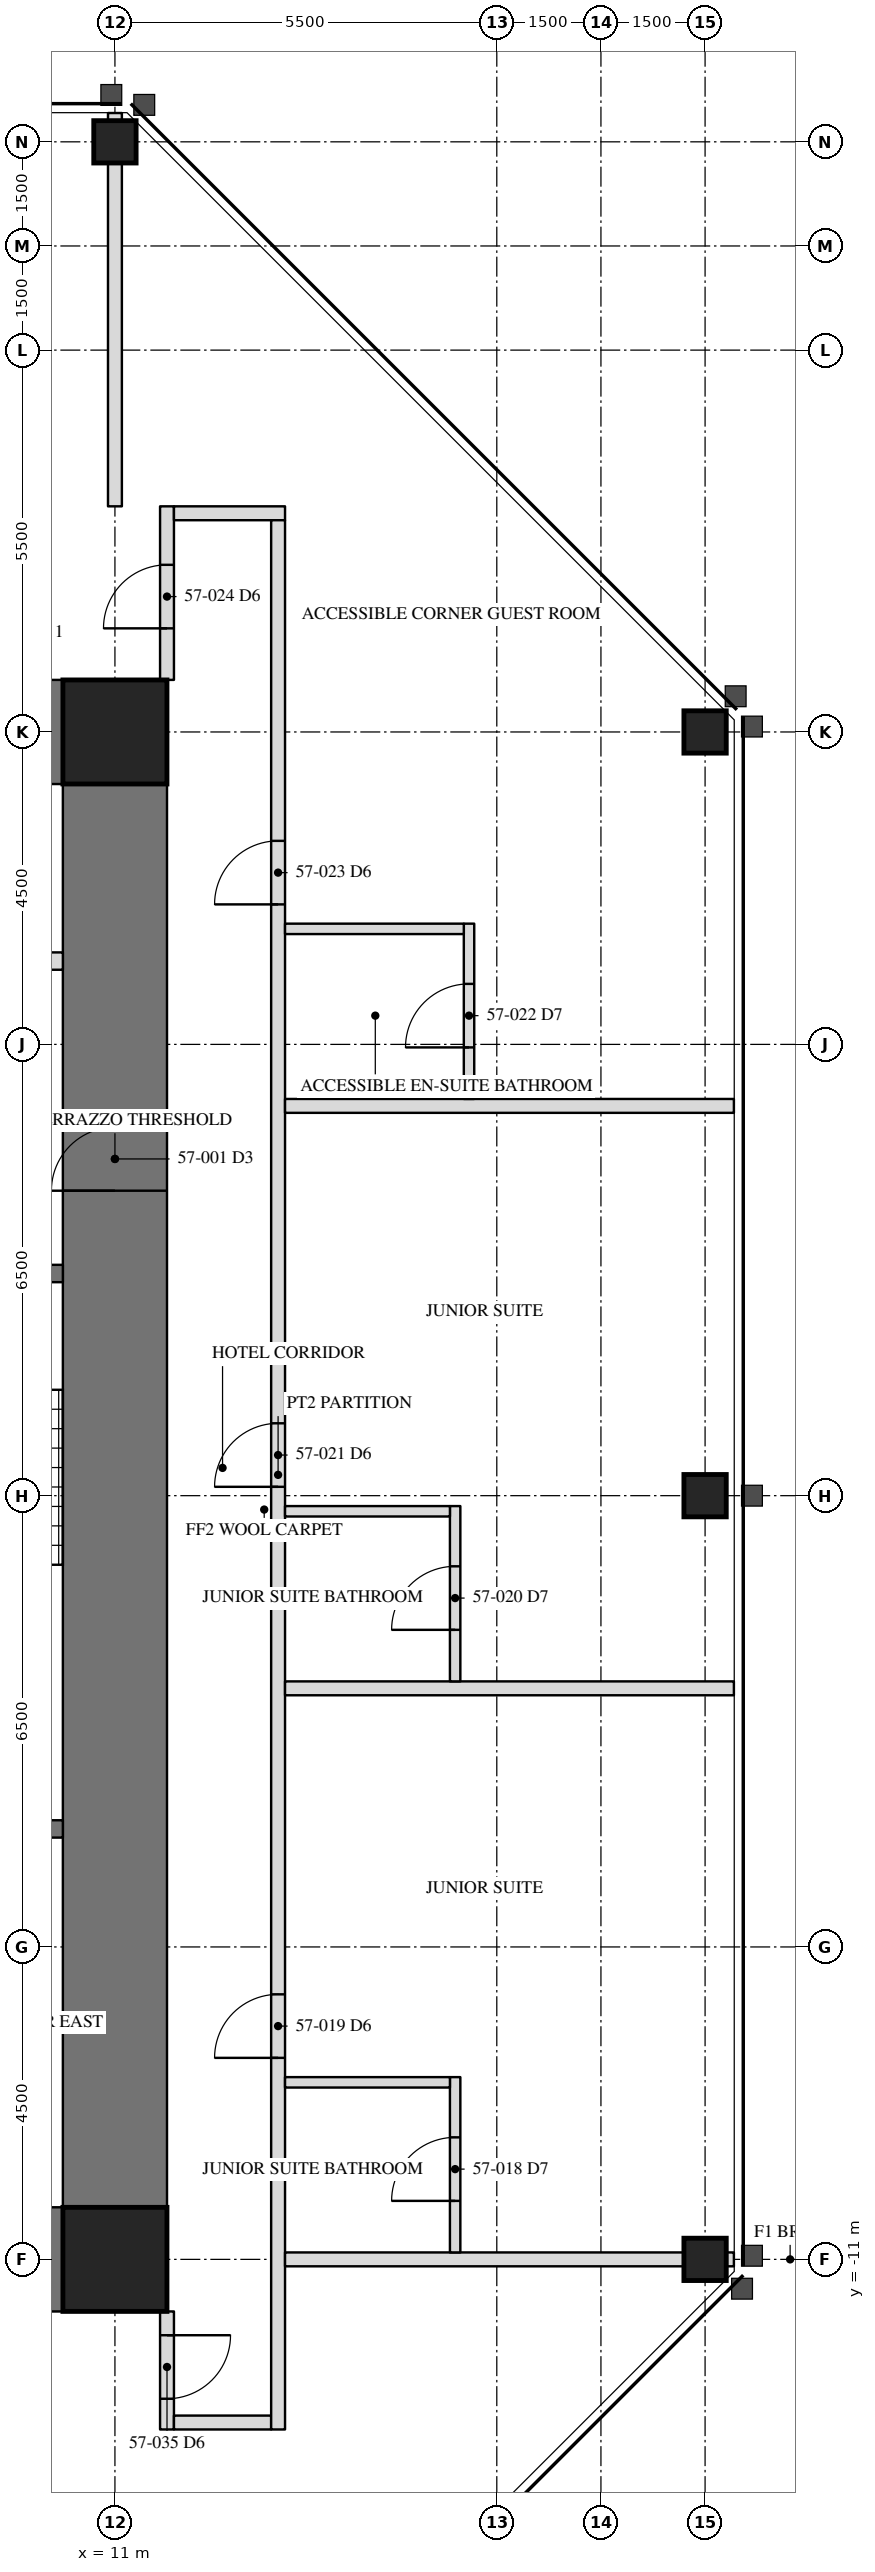
"""IFC4 building model, lengths in metres.
Left out: names, types, materials, properties, quantities, classifications, styles, units other than length and angle.
Written with IfcOpenShell. Run it as: python <this file> out.ifc"""

import sys

from ifc_helpers import new_model, si_unit, direction, frame, frame_2d, origin, origin_2d, place, context, subcontext, project, spatial, rectangle, hollow_rectangle, extrude, element, fill, save


model = new_model("IFC4")
c1 = context("Model", 3, precision=1e-05, world=origin(), true_north=direction((0.0, 1.0)))
c2 = subcontext(c1, "Body", "Model", "MODEL_VIEW")
j1 = project(units=[si_unit("LENGTHUNIT", "METRE"), si_unit("PLANEANGLEUNIT", "RADIAN")], contexts=[c1])
p1 = place(None, origin())
s1 = spatial("IfcSite", under=j1, at=p1, CompositionType="ELEMENT")
p2 = place(p1, origin())
s2 = spatial("IfcBuilding", under=s1, at=p2, CompositionType="ELEMENT")
p3 = place(p2, frame((0.0, 0.0, 236.2)))
s3 = spatial("IfcBuildingStorey", under=s2, at=p3, CompositionType="ELEMENT", Elevation=236.2)
for number, where, z_axis, x_axis in (
    (1, (19.5, -11.0, 0.0), (0.0, 0.0, 1.0), (0.0, 1.0, 0.0)),
    (2, (19.5, 0.0, 0.0), (0.0, 0.0, 1.0), (0.0, 1.0, 0.0)),
    (3, (19.5, 11.0, 0.0), (0.0, 0.0, 1.0), (0.0, 1.0, 0.0)),
    (4, (11.0, 19.5, 0.0), (0.0, 0.0, 1.0), (1.0, 0.0, 0.0)),
):
    element("IfcColumn", number, at=place(p3, frame(where, z_axis=z_axis, x_axis=x_axis)), inside=s3, PredefinedType="COLUMN", context=c2, shape_type="SweptSolid", body=[
        extrude(hollow_rectangle(XDim=0.61, YDim=0.61, WallThickness=0.051, at=origin_2d()), origin(), (0.0, 0.0, 1.0), 3.5),
    ])
p4 = place(p3, frame((11.0, -11.0, 0.0), z_axis=(0.0, 0.0, 1.0), x_axis=(0.0, 1.0, 0.0)))
e5 = element("IfcWall", 5, at=p4, inside=s3, PredefinedType="SHEAR", context=c2, shape_type="SweptSolid", body=[
    extrude(rectangle(XDim=22.0, YDim=1.5, at=frame_2d((11.0, 0.0))), origin(), (0.0, 0.0, 1.0), 3.5),
])
p5 = place(p4, frame((15.393, 0.0, 0.0)))
e6 = element("IfcOpeningElement", 6, at=p5, cuts=e5, PredefinedType="OPENING", context=c2, shape_type="SweptSolid", body=[
    extrude(rectangle(XDim=0.915, YDim=2.134, at=frame_2d((0.458, 1.067))), frame((0.0, 0.76, 0.0), z_axis=(0.0, -1.0, 0.0), x_axis=(1.0, 0.0, 0.0)), (0.0, 0.0, 1.0), 1.52),
])
for number, where, z_axis, x_axis in (
    (7, (11.0, 11.0, 0.0), (0.0, 0.0, 1.0), (-1.0, 0.0, 0.0)),
    (8, (6.5, -11.0, 0.0), (0.0, 0.0, 1.0), (1.0, 0.0, 0.0)),
):
    element("IfcWall", number, at=place(p3, frame(where, z_axis=z_axis, x_axis=x_axis)), inside=s3, PredefinedType="SHEAR", context=c2, shape_type="SweptSolid", body=[
        extrude(rectangle(XDim=4.5, YDim=1.5, at=frame_2d((2.25, 0.0))), origin(), (0.0, 0.0, 1.0), 3.5),
    ])
for number, where, z_axis, x_axis in (
    (9, (11.0, 11.0, 0.0), (0.0, 0.0, 1.0), (1.0, 0.0, 0.0)),
    (10, (11.0, -11.0, 0.0), (0.0, 0.0, 1.0), (1.0, 0.0, 0.0)),
):
    element("IfcColumn", number, at=place(p3, frame(where, z_axis=z_axis, x_axis=x_axis)), inside=s3, PredefinedType="COLUMN", context=c2, shape_type="SweptSolid", body=[
        extrude(hollow_rectangle(XDim=1.499, YDim=1.499, WallThickness=0.102, at=origin_2d()), origin(), (0.0, 0.0, 1.0), 3.5),
    ])
p6 = place(p3, frame((6.95, -4.8, 0.0), z_axis=(0.0, 0.0, 1.0), x_axis=(1.0, 0.0, 0.0)))
e11 = element("IfcWall", 11, at=p6, inside=s3, PredefinedType="SOLIDWALL", context=c2, shape_type="SweptSolid", body=[
    extrude(rectangle(XDim=3.3, YDim=0.25, at=frame_2d((1.65, 0.0))), origin(), (0.0, 0.0, 1.0), 3.31),
])
p7 = place(p3, frame((6.95, 3.2, 0.0), z_axis=(0.0, 0.0, 1.0), x_axis=(1.0, 0.0, 0.0)))
e12 = element("IfcWall", 12, at=p7, inside=s3, PredefinedType="SOLIDWALL", context=c2, shape_type="SweptSolid", body=[
    extrude(rectangle(XDim=3.3, YDim=0.25, at=frame_2d((1.65, 0.0))), origin(), (0.0, 0.0, 1.0), 3.31),
])
p8 = place(p7, frame((1.116, 0.0, 0.0)))
e13 = element("IfcOpeningElement", 13, at=p8, cuts=e12, PredefinedType="OPENING", context=c2, shape_type="SweptSolid", body=[
    extrude(rectangle(XDim=1.067, YDim=2.134, at=frame_2d((0.533, 1.067))), frame((0.0, 0.135, 0.0), z_axis=(0.0, -1.0, 0.0), x_axis=(1.0, 0.0, 0.0)), (0.0, 0.0, 1.0), 0.27),
])
p9 = place(p3, frame((6.95, 7.7, 0.0), z_axis=(0.0, 0.0, 1.0), x_axis=(1.0, 0.0, 0.0)))
e14 = element("IfcWall", 14, at=p9, inside=s3, PredefinedType="PARTITIONING", context=c2, shape_type="SweptSolid", body=[
    extrude(rectangle(XDim=3.3, YDim=0.25, at=frame_2d((1.65, 0.0))), origin(), (0.0, 0.0, 1.0), 3.31),
])
p10 = place(p9, frame((0.45, 0.0, 0.0)))
e15 = element("IfcOpeningElement", 15, at=p10, cuts=e14, PredefinedType="OPENING", context=c2, shape_type="SweptSolid", body=[
    extrude(rectangle(XDim=1.219, YDim=2.134, at=frame_2d((0.609, 1.067))), frame((0.0, 0.135, 0.0), z_axis=(0.0, -1.0, 0.0), x_axis=(1.0, 0.0, 0.0)), (0.0, 0.0, 1.0), 0.27),
])
p11 = place(p3, frame((11.75, 11.75, 0.0), z_axis=(0.0, 0.0, 1.0), x_axis=(0.0, 1.0, 0.0)))
e16 = element("IfcWall", 16, at=p11, inside=s3, PredefinedType="PARTITIONING", context=c2, shape_type="SweptSolid", body=[
    extrude(rectangle(XDim=2.5, YDim=0.2, at=frame_2d((1.25, 0.0))), origin(), (0.0, 0.0, 1.0), 3.31),
])
p12 = place(p11, frame((0.742, 0.0, 0.0)))
e17 = element("IfcOpeningElement", 17, at=p12, cuts=e16, PredefinedType="OPENING", context=c2, shape_type="SweptSolid", body=[
    extrude(rectangle(XDim=0.915, YDim=2.134, at=frame_2d((0.458, 1.067))), frame((0.0, 0.11, 0.0), z_axis=(0.0, -1.0, 0.0), x_axis=(1.0, 0.0, 0.0)), (0.0, 0.0, 1.0), 0.22),
])
p13 = place(p3, frame((13.45, 14.15, 0.0), z_axis=(0.0, 0.0, 1.0), x_axis=(-1.0, 0.0, 0.0)))
e18 = element("IfcWall", 18, at=p13, inside=s3, PredefinedType="PARTITIONING", context=c2, shape_type="SweptSolid", body=[
    extrude(rectangle(XDim=1.6, YDim=0.2, at=frame_2d((0.8, 0.0))), origin(), (0.0, 0.0, 1.0), 3.31),
])
p14 = place(p3, frame((11.75, -11.75, 0.0), z_axis=(0.0, 0.0, 1.0), x_axis=(0.0, -1.0, 0.0)))
e19 = element("IfcWall", 19, at=p14, inside=s3, PredefinedType="PARTITIONING", context=c2, shape_type="SweptSolid", body=[
    extrude(rectangle(XDim=1.7, YDim=0.2, at=frame_2d((0.85, 0.0))), origin(), (0.0, 0.0, 1.0), 3.31),
])
p15 = place(p14, frame((0.343, 0.0, 0.0)))
e20 = element("IfcOpeningElement", 20, at=p15, cuts=e19, PredefinedType="OPENING", context=c2, shape_type="SweptSolid", body=[
    extrude(rectangle(XDim=0.915, YDim=2.134, at=frame_2d((0.458, 1.067))), frame((0.0, 0.11, 0.0), z_axis=(0.0, -1.0, 0.0), x_axis=(1.0, 0.0, 0.0)), (0.0, 0.0, 1.0), 0.22),
])
p16 = place(p3, frame((11.85, -13.35, 0.0), z_axis=(0.0, 0.0, 1.0), x_axis=(1.0, 0.0, 0.0)))
e21 = element("IfcWall", 21, at=p16, inside=s3, PredefinedType="PARTITIONING", context=c2, shape_type="SweptSolid", body=[
    extrude(rectangle(XDim=1.4, YDim=0.2, at=frame_2d((0.7, 0.0))), origin(), (0.0, 0.0, 1.0), 3.31),
])
p17 = place(p3, frame((13.35, -13.45, 0.0), z_axis=(0.0, 0.0, 1.0), x_axis=(0.0, 1.0, 0.0)))
e22 = element("IfcWall", 22, at=p17, inside=s3, PredefinedType="PARTITIONING", context=c2, shape_type="SweptSolid", body=[
    extrude(rectangle(XDim=27.5, YDim=0.2, at=frame_2d((13.75, 0.0))), origin(), (0.0, 0.0, 1.0), 3.31),
])
p18 = place(p17, frame((5.353, 0.0, 0.0)))
e23 = element("IfcOpeningElement", 23, at=p18, cuts=e22, PredefinedType="OPENING", context=c2, shape_type="SweptSolid", body=[
    extrude(rectangle(XDim=0.915, YDim=2.134, at=frame_2d((0.458, 1.067))), frame((0.0, 0.11, 0.0), z_axis=(0.0, -1.0, 0.0), x_axis=(1.0, 0.0, 0.0)), (0.0, 0.0, 1.0), 0.22),
])
p19 = place(p17, frame((13.577, 0.0, 0.0)))
e24 = element("IfcOpeningElement", 24, at=p19, cuts=e22, PredefinedType="OPENING", context=c2, shape_type="SweptSolid", body=[
    extrude(rectangle(XDim=0.915, YDim=2.134, at=frame_2d((0.458, 1.067))), frame((0.0, 0.11, 0.0), z_axis=(0.0, -1.0, 0.0), x_axis=(1.0, 0.0, 0.0)), (0.0, 0.0, 1.0), 0.22),
])
p20 = place(p17, frame((21.967, 0.0, 0.0)))
e25 = element("IfcOpeningElement", 25, at=p20, cuts=e22, PredefinedType="OPENING", context=c2, shape_type="SweptSolid", body=[
    extrude(rectangle(XDim=0.915, YDim=2.134, at=frame_2d((0.458, 1.067))), frame((0.0, 0.11, 0.0), z_axis=(0.0, -1.0, 0.0), x_axis=(1.0, 0.0, 0.0)), (0.0, 0.0, 1.0), 0.22),
])
p21 = place(p3, frame((13.45, -11.0, 0.0), z_axis=(0.0, 0.0, 1.0), x_axis=(1.0, 0.0, 0.0)))
e26 = element("IfcWall", 26, at=p21, inside=s3, PredefinedType="PARTITIONING", context=c2, shape_type="SweptSolid", body=[
    extrude(rectangle(XDim=6.465, YDim=0.2, at=frame_2d((3.232, 0.0))), origin(), (0.0, 0.0, 1.0), 2.802),
])
for number, where, z_axis, x_axis in (
    (27, (13.45, -2.775, 0.0), (0.0, 0.0, 1.0), (1.0, 0.0, 0.0)),
    (28, (13.45, 5.614, 0.0), (0.0, 0.0, 1.0), (1.0, 0.0, 0.0)),
):
    element("IfcWall", number, at=place(p3, frame(where, z_axis=z_axis, x_axis=x_axis)), inside=s3, PredefinedType="PARTITIONING", context=c2, shape_type="SweptSolid", body=[
        extrude(rectangle(XDim=6.465, YDim=0.2, at=frame_2d((3.232, 0.0))), origin(), (0.0, 0.0, 1.0), 3.31),
    ])
p22 = place(p3, frame((15.9, -10.9, 0.0), z_axis=(0.0, 0.0, 1.0), x_axis=(0.0, 1.0, 0.0)))
e29 = element("IfcWall", 29, at=p22, inside=s3, PredefinedType="PARTITIONING", context=c2, shape_type="SweptSolid", body=[
    extrude(rectangle(XDim=2.525, YDim=0.15, at=frame_2d((1.262, 0.0))), origin(), (0.0, 0.0, 1.0), 3.31),
])
p23 = place(p22, frame((0.742, 0.0, 0.0)))
e30 = element("IfcOpeningElement", 30, at=p23, cuts=e29, PredefinedType="OPENING", context=c2, shape_type="SweptSolid", body=[
    extrude(rectangle(XDim=0.915, YDim=2.032, at=frame_2d((0.458, 1.016))), frame((0.0, 0.085, 0.0), z_axis=(0.0, -1.0, 0.0), x_axis=(1.0, 0.0, 0.0)), (0.0, 0.0, 1.0), 0.17),
])
p24 = place(p3, frame((13.45, -8.45, 0.0), z_axis=(0.0, 0.0, 1.0), x_axis=(1.0, 0.0, 0.0)))
e31 = element("IfcWall", 31, at=p24, inside=s3, PredefinedType="PARTITIONING", context=c2, shape_type="SweptSolid", body=[
    extrude(rectangle(XDim=2.375, YDim=0.15, at=frame_2d((1.188, 0.0))), origin(), (0.0, 0.0, 1.0), 3.31),
])
p25 = place(p3, frame((15.9, -2.675, 0.0), z_axis=(0.0, 0.0, 1.0), x_axis=(0.0, 1.0, 0.0)))
e32 = element("IfcWall", 32, at=p25, inside=s3, PredefinedType="PARTITIONING", context=c2, shape_type="SweptSolid", body=[
    extrude(rectangle(XDim=2.525, YDim=0.15, at=frame_2d((1.263, 0.0))), origin(), (0.0, 0.0, 1.0), 3.31),
])
p26 = place(p25, frame((0.742, 0.0, 0.0)))
e33 = element("IfcOpeningElement", 33, at=p26, cuts=e32, PredefinedType="OPENING", context=c2, shape_type="SweptSolid", body=[
    extrude(rectangle(XDim=0.915, YDim=2.032, at=frame_2d((0.458, 1.016))), frame((0.0, 0.085, 0.0), z_axis=(0.0, -1.0, 0.0), x_axis=(1.0, 0.0, 0.0)), (0.0, 0.0, 1.0), 0.17),
])
p27 = place(p3, frame((13.45, -0.225, 0.0), z_axis=(0.0, 0.0, 1.0), x_axis=(1.0, 0.0, 0.0)))
e34 = element("IfcWall", 34, at=p27, inside=s3, PredefinedType="PARTITIONING", context=c2, shape_type="SweptSolid", body=[
    extrude(rectangle(XDim=2.375, YDim=0.15, at=frame_2d((1.188, 0.0))), origin(), (0.0, 0.0, 1.0), 3.31),
])
p28 = place(p3, frame((16.1, 5.714, 0.0), z_axis=(0.0, 0.0, 1.0), x_axis=(0.0, 1.0, 0.0)))
e35 = element("IfcWall", 35, at=p28, inside=s3, PredefinedType="PARTITIONING", context=c2, shape_type="SweptSolid", body=[
    extrude(rectangle(XDim=2.525, YDim=0.15, at=frame_2d((1.262, 0.0))), origin(), (0.0, 0.0, 1.0), 3.31),
])
p29 = place(p28, frame((0.742, 0.0, 0.0)))
e36 = element("IfcOpeningElement", 36, at=p29, cuts=e35, PredefinedType="OPENING", context=c2, shape_type="SweptSolid", body=[
    extrude(rectangle(XDim=0.915, YDim=2.032, at=frame_2d((0.458, 1.016))), frame((0.0, 0.085, 0.0), z_axis=(0.0, -1.0, 0.0), x_axis=(1.0, 0.0, 0.0)), (0.0, 0.0, 1.0), 0.17),
])
p30 = place(p3, frame((13.45, 8.164, 0.0), z_axis=(0.0, 0.0, 1.0), x_axis=(1.0, 0.0, 0.0)))
e37 = element("IfcWall", 37, at=p30, inside=s3, PredefinedType="PARTITIONING", context=c2, shape_type="SweptSolid", body=[
    extrude(rectangle(XDim=2.575, YDim=0.15, at=frame_2d((1.288, 0.0))), origin(), (0.0, 0.0, 1.0), 3.31),
])
p31 = place(p3, frame((11.0, 14.25, 0.0), z_axis=(0.0, 0.0, 1.0), x_axis=(0.0, 1.0, 0.0)))
e38 = element("IfcWall", 38, at=p31, inside=s3, PredefinedType="PARTITIONING", context=c2, shape_type="SweptSolid", body=[
    extrude(rectangle(XDim=5.665, YDim=0.2, at=frame_2d((2.833, 0.0))), origin(), (0.0, 0.0, 1.0), 2.802),
])
p32 = place(p5, origin())
e39 = element("IfcDoor", 39, at=p32, inside=s3, OperationType="SINGLE_SWING_RIGHT", PredefinedType="DOOR", context=c2, shape_type="SweptSolid", body=[
    extrude(rectangle(XDim=0.915, YDim=2.134, at=frame_2d((0.458, 1.067))), frame((0.0, -0.675, 0.0), z_axis=(0.0, -1.0, 0.0), x_axis=(1.0, 0.0, 0.0)), (0.0, 0.0, 1.0), 0.05),
])
fill(e6, e39)
p33 = place(p23, origin())
e40 = element("IfcDoor", 40, at=p33, inside=s3, OperationType="SINGLE_SWING_LEFT", PredefinedType="DOOR", context=c2, shape_type="SweptSolid", body=[
    extrude(rectangle(XDim=0.915, YDim=2.032, at=frame_2d((0.458, 1.016))), frame((0.0, 0.025, 0.0), z_axis=(0.0, -1.0, 0.0), x_axis=(1.0, 0.0, 0.0)), (0.0, 0.0, 1.0), 0.05),
])
fill(e30, e40)
p34 = place(p18, origin())
e41 = element("IfcDoor", 41, at=p34, inside=s3, OperationType="SINGLE_SWING_LEFT", PredefinedType="DOOR", context=c2, shape_type="SweptSolid", body=[
    extrude(rectangle(XDim=0.915, YDim=2.134, at=frame_2d((0.458, 1.067))), frame((0.0, 0.025, 0.0), z_axis=(0.0, -1.0, 0.0), x_axis=(1.0, 0.0, 0.0)), (0.0, 0.0, 1.0), 0.05),
])
fill(e23, e41)
p35 = place(p26, origin())
e42 = element("IfcDoor", 42, at=p35, inside=s3, OperationType="SINGLE_SWING_LEFT", PredefinedType="DOOR", context=c2, shape_type="SweptSolid", body=[
    extrude(rectangle(XDim=0.915, YDim=2.032, at=frame_2d((0.458, 1.016))), frame((0.0, 0.025, 0.0), z_axis=(0.0, -1.0, 0.0), x_axis=(1.0, 0.0, 0.0)), (0.0, 0.0, 1.0), 0.05),
])
fill(e33, e42)
p36 = place(p19, origin())
e43 = element("IfcDoor", 43, at=p36, inside=s3, OperationType="SINGLE_SWING_LEFT", PredefinedType="DOOR", context=c2, shape_type="SweptSolid", body=[
    extrude(rectangle(XDim=0.915, YDim=2.134, at=frame_2d((0.458, 1.067))), frame((0.0, 0.025, 0.0), z_axis=(0.0, -1.0, 0.0), x_axis=(1.0, 0.0, 0.0)), (0.0, 0.0, 1.0), 0.05),
])
fill(e24, e43)
p37 = place(p29, origin())
e44 = element("IfcDoor", 44, at=p37, inside=s3, OperationType="SINGLE_SWING_LEFT", PredefinedType="DOOR", context=c2, shape_type="SweptSolid", body=[
    extrude(rectangle(XDim=0.915, YDim=2.032, at=frame_2d((0.458, 1.016))), frame((0.0, 0.025, 0.0), z_axis=(0.0, -1.0, 0.0), x_axis=(1.0, 0.0, 0.0)), (0.0, 0.0, 1.0), 0.05),
])
fill(e36, e44)
p38 = place(p20, origin())
e45 = element("IfcDoor", 45, at=p38, inside=s3, OperationType="SINGLE_SWING_LEFT", PredefinedType="DOOR", context=c2, shape_type="SweptSolid", body=[
    extrude(rectangle(XDim=0.915, YDim=2.134, at=frame_2d((0.458, 1.067))), frame((0.0, 0.025, 0.0), z_axis=(0.0, -1.0, 0.0), x_axis=(1.0, 0.0, 0.0)), (0.0, 0.0, 1.0), 0.05),
])
fill(e25, e45)
p39 = place(p12, origin())
e46 = element("IfcDoor", 46, at=p39, inside=s3, OperationType="SINGLE_SWING_LEFT", PredefinedType="DOOR", context=c2, shape_type="SweptSolid", body=[
    extrude(rectangle(XDim=0.915, YDim=2.134, at=frame_2d((0.458, 1.067))), frame((0.0, 0.025, 0.0), z_axis=(0.0, -1.0, 0.0), x_axis=(1.0, 0.0, 0.0)), (0.0, 0.0, 1.0), 0.05),
])
fill(e17, e46)
p40 = place(p15, origin())
e47 = element("IfcDoor", 47, at=p40, inside=s3, OperationType="SINGLE_SWING_LEFT", PredefinedType="DOOR", context=c2, shape_type="SweptSolid", body=[
    extrude(rectangle(XDim=0.915, YDim=2.134, at=frame_2d((0.458, 1.067))), frame((0.0, 0.025, 0.0), z_axis=(0.0, -1.0, 0.0), x_axis=(1.0, 0.0, 0.0)), (0.0, 0.0, 1.0), 0.05),
])
fill(e20, e47)
save(model, sys.argv[1])
